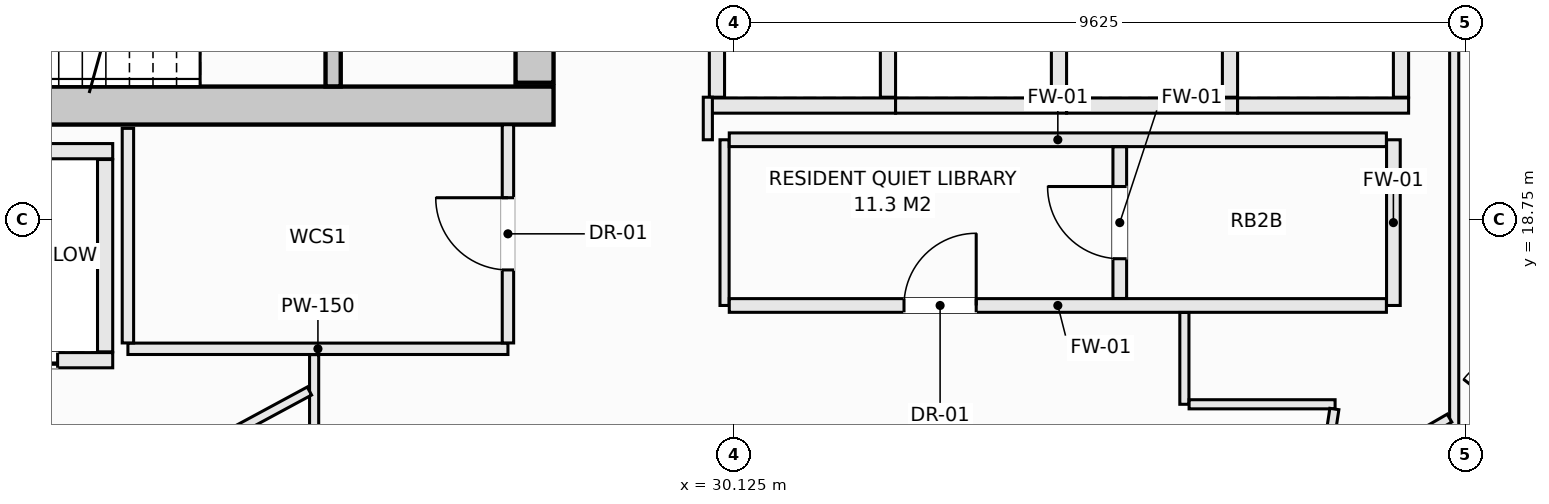
"""IFC4 building model, lengths in metres.
Left out: names, types, materials, properties, quantities, classifications, styles, units other than length and angle.
Written with IfcOpenShell. Run it as: python <this file> out.ifc"""

import sys

from ifc_helpers import new_model, si_unit, direction, frame, frame_2d, origin, place, context, subcontext, project, spatial, rectangle, extrude, element, fill, save


model = new_model("IFC4")
c1 = context("Model", 3, precision=1e-05, world=origin(), true_north=direction((0.0, 1.0)))
c2 = subcontext(c1, "Body", "Model", "MODEL_VIEW")
j1 = project(units=[si_unit("LENGTHUNIT", "METRE"), si_unit("PLANEANGLEUNIT", "RADIAN")], contexts=[c1])
p1 = place(None, origin())
s1 = spatial("IfcSite", under=j1, at=p1, CompositionType="ELEMENT")
p2 = place(p1, origin())
s2 = spatial("IfcBuilding", under=s1, at=p2, CompositionType="ELEMENT")
p3 = place(p2, frame((0.0, 0.0, 249.2)))
s3 = spatial("IfcBuildingStorey", under=s2, at=p3, CompositionType="ELEMENT", Elevation=249.2)
p4 = place(p3, frame((14.25, 20.25, -0.27), z_axis=(0.0, 0.0, 1.0), x_axis=(1.0, 0.0, 0.0)))
e1 = element("IfcWall", 1, at=p4, inside=s3, PredefinedType="SHEAR", context=c2, shape_type="SweptSolid", body=[
    extrude(rectangle(XDim=13.5, YDim=0.5, at=frame_2d((6.75, 0.0))), origin(), (0.0, 0.0, 1.0), 3.3),
])
p5 = place(p3, frame((27.5, 20.55, -0.27), z_axis=(0.0, 0.0, 1.0), x_axis=(0.0, 1.0, 0.0)))
e2 = element("IfcWall", 2, at=p5, inside=s3, PredefinedType="SHEAR", context=c2, shape_type="SweptSolid", body=[
    extrude(rectangle(XDim=1.5, YDim=0.5, at=frame_2d((0.75, 0.0))), origin(), (0.0, 0.0, 1.0), 3.3),
])
p6 = place(p3, frame((24.85, 20.502, -0.27), z_axis=(0.0, 0.0, 1.0), x_axis=(0.0, 1.0, 0.0)))
e3 = element("IfcWall", 3, at=p6, inside=s3, PredefinedType="SHEAR", context=c2, shape_type="SweptSolid", body=[
    extrude(rectangle(XDim=3.038, YDim=0.2, at=frame_2d((1.519, 0.0))), origin(), (0.0, 0.0, 1.0), 3.3),
])
p7 = place(p6, frame((0.969, 0.0, 0.27)))
e4 = element("IfcOpeningElement", 4, at=p7, cuts=e3, PredefinedType="OPENING", context=c2, shape_type="SweptSolid", body=[
    extrude(rectangle(XDim=1.1, YDim=2.15, at=frame_2d((0.55, 1.075))), frame((0.0, 0.11, 0.0), z_axis=(0.0, -1.0, 0.0), x_axis=(1.0, 0.0, 0.0)), (0.0, 0.0, 1.0), 0.22),
])
p8 = place(p3, frame((19.4, 19.65, 0.0), z_axis=(0.0, 0.0, 1.0), x_axis=(1.0, 0.0, 0.0)))
e5 = element("IfcWall", 5, at=p8, inside=s3, PredefinedType="SOLIDWALL", context=c2, shape_type="SweptSolid", body=[
    extrude(rectangle(XDim=2.55, YDim=0.2, at=frame_2d((1.275, 0.0))), origin(), (0.0, 0.0, 1.0), 3.03),
])
p9 = place(p3, frame((19.4, 16.9, 0.0), z_axis=(0.0, 0.0, 1.0), x_axis=(1.0, 0.0, 0.0)))
e6 = element("IfcWall", 6, at=p9, inside=s3, PredefinedType="SOLIDWALL", context=c2, shape_type="SweptSolid", body=[
    extrude(rectangle(XDim=2.55, YDim=0.2, at=frame_2d((1.275, 0.0))), origin(), (0.0, 0.0, 1.0), 3.03),
])
p10 = place(p9, frame((0.725, 0.0, 0.0)))
e7 = element("IfcOpeningElement", 7, at=p10, cuts=e6, PredefinedType="OPENING", context=c2, shape_type="SweptSolid", body=[
    extrude(rectangle(XDim=1.1, YDim=2.2, at=frame_2d((0.55, 1.1))), frame((0.0, 0.11, 0.0), z_axis=(0.0, -1.0, 0.0), x_axis=(1.0, 0.0, 0.0)), (0.0, 0.0, 1.0), 0.22),
])
p11 = place(p3, frame((21.85, 17.01, 0.0), z_axis=(0.0, 0.0, 1.0), x_axis=(0.0, 1.0, 0.0)))
e8 = element("IfcWall", 8, at=p11, inside=s3, PredefinedType="SOLIDWALL", context=c2, shape_type="SweptSolid", body=[
    extrude(rectangle(XDim=2.53, YDim=0.2, at=frame_2d((1.265, 0.0))), origin(), (0.0, 0.0, 1.0), 3.03),
])
p12 = place(p3, frame((29.8, 20.25, 0.0), z_axis=(0.0, 0.0, 1.0), x_axis=(1.0, 0.0, 0.0)))
e9 = element("IfcWall", 9, at=p12, inside=s3, PredefinedType="SOLIDWALL", context=c2, shape_type="SweptSolid", body=[
    extrude(rectangle(XDim=2.45, YDim=0.2, at=frame_2d((1.225, 0.0))), origin(), (0.0, 0.0, 1.0), 3.03),
])
for number, where, z_axis, x_axis in (
    (10, (29.9, 20.36, 0.0), (0.0, 0.0, 1.0), (0.0, 1.0, 0.0)),
    (11, (32.15, 20.36, 0.0), (0.0, 0.0, 1.0), (0.0, 1.0, 0.0)),
):
    element("IfcWall", number, at=place(p3, frame(where, z_axis=z_axis, x_axis=x_axis)), inside=s3, PredefinedType="SOLIDWALL", context=c2, shape_type="SweptSolid", body=[
        extrude(rectangle(XDim=2.43, YDim=0.2, at=frame_2d((1.215, 0.0))), origin(), (0.0, 0.0, 1.0), 3.03),
    ])
p13 = place(p3, frame((32.25, 20.25, 0.0), z_axis=(0.0, 0.0, 1.0), x_axis=(1.0, 0.0, 0.0)))
e12 = element("IfcWall", 12, at=p13, inside=s3, PredefinedType="SOLIDWALL", context=c2, shape_type="SweptSolid", body=[
    extrude(rectangle(XDim=2.25, YDim=0.2, at=frame_2d((1.125, 0.0))), origin(), (0.0, 0.0, 1.0), 3.03),
])
p14 = place(p3, frame((34.4, 20.36, 0.0), z_axis=(0.0, 0.0, 1.0), x_axis=(0.0, 1.0, 0.0)))
e13 = element("IfcWall", 13, at=p14, inside=s3, PredefinedType="SOLIDWALL", context=c2, shape_type="SweptSolid", body=[
    extrude(rectangle(XDim=2.43, YDim=0.2, at=frame_2d((1.215, 0.0))), origin(), (0.0, 0.0, 1.0), 3.03),
])
p15 = place(p3, frame((34.5, 20.25, 0.0), z_axis=(0.0, 0.0, 1.0), x_axis=(1.0, 0.0, 0.0)))
e14 = element("IfcWall", 14, at=p15, inside=s3, PredefinedType="SOLIDWALL", context=c2, shape_type="SweptSolid", body=[
    extrude(rectangle(XDim=2.25, YDim=0.2, at=frame_2d((1.125, 0.0))), origin(), (0.0, 0.0, 1.0), 3.03),
])
p16 = place(p3, frame((36.65, 20.36, 0.0), z_axis=(0.0, 0.0, 1.0), x_axis=(0.0, 1.0, 0.0)))
e15 = element("IfcWall", 15, at=p16, inside=s3, PredefinedType="SOLIDWALL", context=c2, shape_type="SweptSolid", body=[
    extrude(rectangle(XDim=2.43, YDim=0.2, at=frame_2d((1.215, 0.0))), origin(), (0.0, 0.0, 1.0), 3.03),
])
p17 = place(p3, frame((36.75, 20.25, 0.0), z_axis=(0.0, 0.0, 1.0), x_axis=(1.0, 0.0, 0.0)))
e16 = element("IfcWall", 16, at=p17, inside=s3, PredefinedType="SOLIDWALL", context=c2, shape_type="SweptSolid", body=[
    extrude(rectangle(XDim=2.25, YDim=0.2, at=frame_2d((1.125, 0.0))), origin(), (0.0, 0.0, 1.0), 3.03),
])
p18 = place(p3, frame((38.9, 20.36, 0.0), z_axis=(0.0, 0.0, 1.0), x_axis=(0.0, 1.0, 0.0)))
e17 = element("IfcWall", 17, at=p18, inside=s3, PredefinedType="SOLIDWALL", context=c2, shape_type="SweptSolid", body=[
    extrude(rectangle(XDim=2.43, YDim=0.2, at=frame_2d((1.215, 0.0))), origin(), (0.0, 0.0, 1.0), 3.03),
])
p19 = place(p3, frame((22.15, 17.05, 0.0), z_axis=(0.0, 0.0, 1.0), x_axis=(1.0, 0.0, 0.0)))
e18 = element("IfcWall", 18, at=p19, inside=s3, PredefinedType="PARTITIONING", context=c2, shape_type="SweptSolid", body=[
    extrude(rectangle(XDim=5.0, YDim=0.15, at=frame_2d((2.5, 0.0))), origin(), (0.0, 0.0, 1.0), 3.03),
])
p20 = place(p3, frame((22.15, 17.127, 0.0), z_axis=(0.0, 0.0, 1.0), x_axis=(0.0, 1.0, 0.0)))
e19 = element("IfcWall", 19, at=p20, inside=s3, PredefinedType="PARTITIONING", context=c2, shape_type="SweptSolid", body=[
    extrude(rectangle(XDim=2.823, YDim=0.15, at=frame_2d((1.412, 0.0))), origin(), (0.0, 0.0, 1.0), 3.03),
])
p21 = place(p3, frame((27.15, 17.127, 0.0), z_axis=(0.0, 0.0, 1.0), x_axis=(0.0, 1.0, 0.0)))
e20 = element("IfcWall", 20, at=p21, inside=s3, PredefinedType="PARTITIONING", context=c2, shape_type="SweptSolid", body=[
    extrude(rectangle(XDim=2.871, YDim=0.15, at=frame_2d((1.436, 0.0))), origin(), (0.0, 0.0, 1.0), 3.03),
])
p22 = place(p21, frame((0.96, 0.0, 0.0)))
e21 = element("IfcOpeningElement", 21, at=p22, cuts=e20, PredefinedType="OPENING", context=c2, shape_type="SweptSolid", body=[
    extrude(rectangle(XDim=0.95, YDim=2.1, at=frame_2d((0.475, 1.05))), frame((0.0, 0.085, 0.0), z_axis=(0.0, -1.0, 0.0), x_axis=(1.0, 0.0, 0.0)), (0.0, 0.0, 1.0), 0.17),
])
p23 = place(p3, frame((30.0, 17.62, 0.0), z_axis=(0.0, 0.0, 1.0), x_axis=(0.0, 1.0, 0.0)))
e22 = element("IfcWall", 22, at=p23, inside=s3, PredefinedType="PARTITIONING", context=c2, shape_type="SweptSolid", body=[
    extrude(rectangle(XDim=2.18, YDim=0.12, at=frame_2d((1.09, 0.0))), origin(), (0.0, 0.0, 1.0), 3.03),
])
p24 = place(p3, frame((38.8, 17.62, 0.0), z_axis=(0.0, 0.0, 1.0), x_axis=(0.0, 1.0, 0.0)))
e23 = element("IfcWall", 23, at=p24, inside=s3, PredefinedType="SOLIDWALL", context=c2, shape_type="SweptSolid", body=[
    extrude(rectangle(XDim=2.18, YDim=0.18, at=frame_2d((1.09, 0.0))), origin(), (0.0, 0.0, 1.0), 3.03),
])
p25 = place(p3, frame((30.062, 17.62, 0.0), z_axis=(0.0, 0.0, 1.0), x_axis=(1.0, 0.0, 0.0)))
e24 = element("IfcWall", 24, at=p25, inside=s3, PredefinedType="SOLIDWALL", context=c2, shape_type="SweptSolid", body=[
    extrude(rectangle(XDim=8.646, YDim=0.18, at=frame_2d((4.323, 0.0))), origin(), (0.0, 0.0, 1.0), 3.03),
])
p26 = place(p25, frame((2.299, 0.0, 0.0)))
e25 = element("IfcOpeningElement", 25, at=p26, cuts=e24, PredefinedType="OPENING", context=c2, shape_type="SweptSolid", body=[
    extrude(rectangle(XDim=0.95, YDim=2.1, at=frame_2d((0.475, 1.05))), frame((0.0, 0.1, 0.0), z_axis=(0.0, -1.0, 0.0), x_axis=(1.0, 0.0, 0.0)), (0.0, 0.0, 1.0), 0.2),
])
p27 = place(p3, frame((30.062, 19.8, 0.0), z_axis=(0.0, 0.0, 1.0), x_axis=(1.0, 0.0, 0.0)))
e26 = element("IfcWall", 26, at=p27, inside=s3, PredefinedType="SOLIDWALL", context=c2, shape_type="SweptSolid", body=[
    extrude(rectangle(XDim=8.646, YDim=0.18, at=frame_2d((4.323, 0.0))), origin(), (0.0, 0.0, 1.0), 3.03),
])
p28 = place(p3, frame((35.2, 17.712, 0.0), z_axis=(0.0, 0.0, 1.0), x_axis=(0.0, 1.0, 0.0)))
e27 = element("IfcWall", 27, at=p28, inside=s3, PredefinedType="SOLIDWALL", context=c2, shape_type="SweptSolid", body=[
    extrude(rectangle(XDim=1.996, YDim=0.18, at=frame_2d((0.998, 0.0))), origin(), (0.0, 0.0, 1.0), 3.03),
])
p29 = place(p28, frame((0.523, 0.0, 0.0)))
e28 = element("IfcOpeningElement", 28, at=p29, cuts=e27, PredefinedType="OPENING", context=c2, shape_type="SweptSolid", body=[
    extrude(rectangle(XDim=0.95, YDim=2.1, at=frame_2d((0.475, 1.05))), frame((0.0, 0.1, 0.0), z_axis=(0.0, -1.0, 0.0), x_axis=(1.0, 0.0, 0.0)), (0.0, 0.0, 1.0), 0.2),
])
p30 = place(p3, frame((39.6, 14.952, 0.0), z_axis=(0.0, 0.0, 1.0), x_axis=(0.0, 1.0, 0.0)))
e29 = element("IfcWall", 29, at=p30, inside=s3, PredefinedType="PARTITIONING", context=c2, shape_type="SweptSolid", body=[
    extrude(rectangle(XDim=8.068, YDim=0.12, at=frame_2d((4.034, 0.0))), origin(), (0.0, 0.0, 1.0), 2.478),
])
p31 = place(p3, frame((39.662, 15.031, 0.0), z_axis=(0.0, 0.0, 1.0), x_axis=(0.616500468458, 0.787354540465, 0.0)))
e30 = element("IfcWall", 30, at=p31, inside=s3, PredefinedType="PARTITIONING", context=c2, shape_type="SweptSolid", body=[
    extrude(rectangle(XDim=3.014, YDim=0.12, at=frame_2d((1.507, 0.0))), origin(), (0.0, 0.0, 1.0), 3.03),
])
p32 = place(p31, frame((1.312, 0.0, 0.0)))
e31 = element("IfcOpeningElement", 31, at=p32, cuts=e30, PredefinedType="OPENING", context=c2, shape_type="SweptSolid", body=[
    extrude(rectangle(XDim=0.95, YDim=2.1, at=frame_2d((0.475, 1.05))), frame((0.0, 0.07, 0.0), z_axis=(0.0, -1.0, 0.0), x_axis=(1.0, 0.0, 0.0)), (0.0, 0.0, 1.0), 0.14),
])
p33 = place(p3, frame((29.78, 19.8, 0.0), z_axis=(0.0, 0.0, 1.0), x_axis=(0.0, 1.0, 0.0)))
e32 = element("IfcWall", 32, at=p33, inside=s3, PredefinedType="PARTITIONING", context=c2, shape_type="SweptSolid", body=[
    extrude(rectangle(XDim=0.56, YDim=0.12, at=frame_2d((0.28, 0.0))), origin(), (0.0, 0.0, 1.0), 3.03),
])
p34 = place(p3, frame((36.05, 16.32, 0.0), z_axis=(0.0, 0.0, 1.0), x_axis=(0.0, 1.0, 0.0)))
e33 = element("IfcWall", 33, at=p34, inside=s3, PredefinedType="PARTITIONING", context=c2, shape_type="SweptSolid", body=[
    extrude(rectangle(XDim=1.208, YDim=0.12, at=frame_2d((0.604, 0.0))), origin(), (0.0, 0.0, 1.0), 3.03),
])
p35 = place(p3, frame((36.112, 16.32, 0.0), z_axis=(0.0, 0.0, 1.0), x_axis=(1.0, 0.0, 0.0)))
e34 = element("IfcWall", 34, at=p35, inside=s3, PredefinedType="PARTITIONING", context=c2, shape_type="SweptSolid", body=[
    extrude(rectangle(XDim=1.921, YDim=0.12, at=frame_2d((0.96, 0.0))), origin(), (0.0, 0.0, 1.0), 3.03),
])
p36 = place(p3, frame((37.862, 15.201, 0.0), z_axis=(0.0, 0.0, 1.0), x_axis=(0.150907653202, 0.988547864398, 0.0)))
e35 = element("IfcWall", 35, at=p36, inside=s3, PredefinedType="PARTITIONING", context=c2, shape_type="SweptSolid", body=[
    extrude(rectangle(XDim=1.069, YDim=0.12, at=frame_2d((0.535, 0.0))), origin(), (0.0, 0.0, 1.0), 3.03),
])
p37 = place(p3, frame((24.6, 14.462, 0.0), z_axis=(0.0, 0.0, 1.0), x_axis=(0.0, 1.0, 0.0)))
e36 = element("IfcWall", 36, at=p37, inside=s3, PredefinedType="PARTITIONING", context=c2, shape_type="SweptSolid", body=[
    extrude(rectangle(XDim=2.511, YDim=0.12, at=frame_2d((1.255, 0.0))), origin(), (0.0, 0.0, 1.0), 3.03),
])
p38 = place(p3, frame((17.895, 12.91, 0.0), z_axis=(0.0, 0.0, 1.0), x_axis=(0.880038694226, 0.474901986377, 0.0)))
e37 = element("IfcWall", 37, at=p38, inside=s3, PredefinedType="PARTITIONING", context=c2, shape_type="SweptSolid", body=[
    extrude(rectangle(XDim=7.548, YDim=0.12, at=frame_2d((3.774, 0.0))), origin(), (0.0, 0.0, 1.0), 2.478),
])
p39 = place(p3, frame((37.925, 15.204, 0.0), z_axis=(0.0, 0.0, 1.0), x_axis=(0.865342568062, 0.501180845505, 0.0)))
e38 = element("IfcWall", 38, at=p39, inside=s3, PredefinedType="PARTITIONING", context=c2, shape_type="SweptSolid", body=[
    extrude(rectangle(XDim=1.864, YDim=0.12, at=frame_2d((0.932, 0.0))), origin(), (0.0, 0.0, 1.0), 2.478),
])
p40 = place(p10, origin())
e39 = element("IfcDoor", 39, at=p40, inside=s3, OperationType="SLIDING_TO_LEFT", PredefinedType="DOOR", context=c2, shape_type="SweptSolid", body=[
    extrude(rectangle(XDim=1.1, YDim=2.2, at=frame_2d((0.55, 1.1))), frame((0.0, 0.025, 0.0), z_axis=(0.0, -1.0, 0.0), x_axis=(1.0, 0.0, 0.0)), (0.0, 0.0, 1.0), 0.05),
])
fill(e7, e39)
p41 = place(p22, origin())
e40 = element("IfcDoor", 40, at=p41, inside=s3, OperationType="SINGLE_SWING_RIGHT", PredefinedType="DOOR", context=c2, shape_type="SweptSolid", body=[
    extrude(rectangle(XDim=0.95, YDim=2.1, at=frame_2d((0.475, 1.05))), frame((0.0, 0.025, 0.0), z_axis=(0.0, -1.0, 0.0), x_axis=(1.0, 0.0, 0.0)), (0.0, 0.0, 1.0), 0.05),
])
fill(e21, e40)
p42 = place(p26, origin())
e41 = element("IfcDoor", 41, at=p42, inside=s3, OperationType="SINGLE_SWING_RIGHT", PredefinedType="DOOR", context=c2, shape_type="SweptSolid", body=[
    extrude(rectangle(XDim=0.95, YDim=2.1, at=frame_2d((0.475, 1.05))), frame((0.0, 0.025, 0.0), z_axis=(0.0, -1.0, 0.0), x_axis=(1.0, 0.0, 0.0)), (0.0, 0.0, 1.0), 0.05),
])
fill(e25, e41)
p43 = place(p29, origin())
e42 = element("IfcDoor", 42, at=p43, inside=s3, OperationType="SINGLE_SWING_RIGHT", PredefinedType="DOOR", context=c2, shape_type="SweptSolid", body=[
    extrude(rectangle(XDim=0.95, YDim=2.1, at=frame_2d((0.475, 1.05))), frame((0.0, 0.025, 0.0), z_axis=(0.0, -1.0, 0.0), x_axis=(1.0, 0.0, 0.0)), (0.0, 0.0, 1.0), 0.05),
])
fill(e28, e42)
save(model, sys.argv[1])
